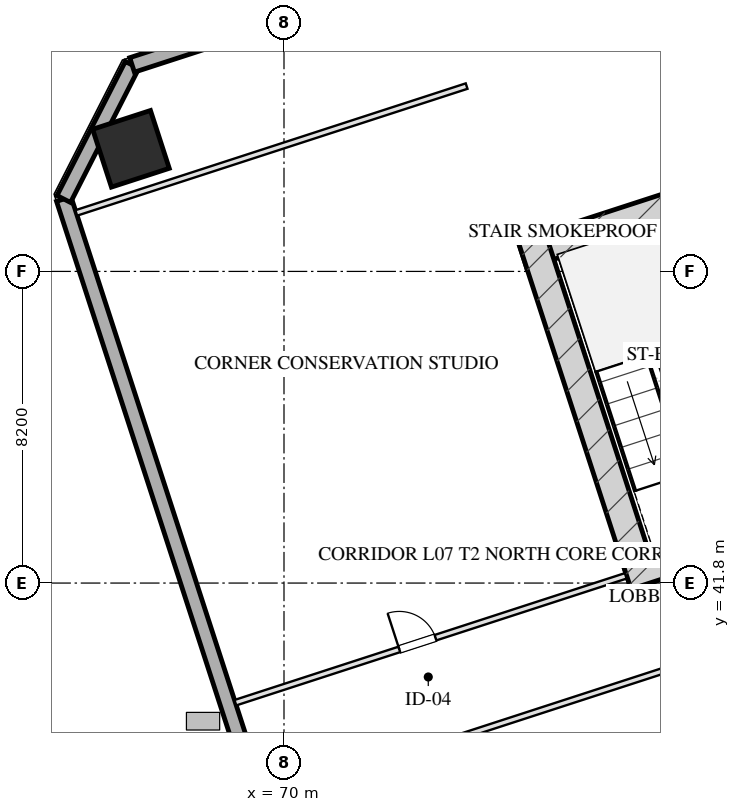
"""IFC4 building model, lengths in metres.
Left out: names, types, materials, properties, quantities, classifications, styles, units other than length and angle.
Written with IfcOpenShell. Run it as: python <this file> out.ifc"""

import sys

from ifc_helpers import new_model, si_unit, direction, frame, frame_2d, origin, origin_2d, place, context, subcontext, project, spatial, rectangle, hollow_rectangle, extrude, element, fill, save


model = new_model("IFC4")
c1 = context("Model", 3, precision=1e-05, world=origin(), true_north=direction((0.0, 1.0)))
c2 = subcontext(c1, "Body", "Model", "MODEL_VIEW")
j1 = project(units=[si_unit("LENGTHUNIT", "METRE"), si_unit("PLANEANGLEUNIT", "RADIAN")], contexts=[c1])
p1 = place(None, origin())
s1 = spatial("IfcSite", under=j1, at=p1, CompositionType="ELEMENT")
p2 = place(p1, origin())
s2 = spatial("IfcBuilding", under=s1, at=p2, CompositionType="ELEMENT")
p3 = place(p2, frame((0.0, 0.0, 34.0)))
s3 = spatial("IfcBuildingStorey", under=s2, at=p3, CompositionType="ELEMENT", Elevation=34.0)
p4 = place(p3, frame((76.272, 50.443, 0.0), z_axis=(0.0, 0.0, 1.0), x_axis=(0.951056072937, 0.309018358888, 0.0)))
e1 = element("IfcWall", 1, at=p4, inside=s3, PredefinedType="SHEAR", context=c2, shape_type="SweptSolid", body=[
    extrude(rectangle(XDim=16.55, YDim=0.75, at=frame_2d((8.275, 0.0))), origin(), (0.0, 0.0, 1.0), 4.0),
])
p5 = place(p3, frame((79.489, 41.756, 0.0), z_axis=(0.0, 0.0, 1.0), x_axis=(-0.309016134813, 0.951056795583, 0.0)))
e2 = element("IfcWall", 2, at=p5, inside=s3, PredefinedType="SHEAR", context=c2, shape_type="SweptSolid", body=[
    extrude(rectangle(XDim=9.63, YDim=0.75, at=frame_2d((4.815, 0.0))), origin(), (0.0, 0.0, 1.0), 4.0),
])
p6 = place(p3, frame((79.016, 41.997, 0.0), z_axis=(0.0, 0.0, 1.0), x_axis=(0.95106038264, 0.309005094736, 0.0)))
e3 = element("IfcWall", 3, at=p6, inside=s3, PredefinedType="SHEAR", context=c2, shape_type="SweptSolid", body=[
    extrude(rectangle(XDim=4.295, YDim=0.75, at=frame_2d((2.147, 0.0))), origin(), (0.0, 0.0, 1.0), 4.0),
])
p7 = place(p3, frame((65.973, 53.226, 0.0), z_axis=(0.0, 0.0, 1.0), x_axis=(0.951056516295, 0.309016994375, 0.0)))
e4 = element("IfcColumn", 4, at=p7, inside=s3, PredefinedType="COLUMN", context=c2, shape_type="SweptSolid", body=[
    extrude(hollow_rectangle(XDim=1.6, YDim=1.6, WallThickness=0.055, at=origin_2d()), origin(), (0.0, 0.0, 1.0), 4.001),
])
p8 = place(p3, frame((79.655, 4.352, 0.0), z_axis=(0.0, 0.0, 1.0), x_axis=(-0.309014526607, 0.951057318118, 0.0)))
e5 = element("IfcWall", 5, at=p8, inside=s3, PredefinedType="SOLIDWALL", context=c2, shape_type="SweptSolid", body=[
    extrude(rectangle(XDim=50.0, YDim=0.4, at=frame_2d((25.0, 0.0))), origin(), (0.0, 0.0, 1.0), 3.16),
])
p9 = place(p8, frame((17.35, 0.0, 0.75)))
e6 = element("IfcOpeningElement", 6, at=p9, cuts=e5, PredefinedType="OPENING", context=c2, shape_type="SweptSolid", body=[
    extrude(rectangle(XDim=2.5, YDim=1.75, at=frame_2d((1.25, 0.875))), frame((0.0, 0.21, 0.0), z_axis=(0.0, -1.0, 0.0), x_axis=(1.0, 0.0, 0.0)), (0.0, 0.0, 1.0), 0.42),
])
p10 = place(p8, frame((21.15, 0.0, 0.75)))
e7 = element("IfcOpeningElement", 7, at=p10, cuts=e5, PredefinedType="OPENING", context=c2, shape_type="SweptSolid", body=[
    extrude(rectangle(XDim=2.5, YDim=1.75, at=frame_2d((1.25, 0.875))), frame((0.0, 0.21, 0.0), z_axis=(0.0, -1.0, 0.0), x_axis=(1.0, 0.0, 0.0)), (0.0, 0.0, 1.0), 0.42),
])
p11 = place(p8, frame((27.38, 0.0, 0.0)))
e8 = element("IfcOpeningElement", 8, at=p11, cuts=e5, PredefinedType="OPENING", context=c2, shape_type="SweptSolid", body=[
    extrude(rectangle(XDim=1.1, YDim=2.15, at=frame_2d((0.55, 1.075))), frame((0.0, 0.21, 0.0), z_axis=(0.0, -1.0, 0.0), x_axis=(1.0, 0.0, 0.0)), (0.0, 0.0, 1.0), 0.42),
])
p12 = place(p3, frame((64.205, 51.905, 0.0), z_axis=(0.0, 0.0, 1.0), x_axis=(0.453958106755, 0.891023028497, 0.0)))
e9 = element("IfcWall", 9, at=p12, inside=s3, PredefinedType="SOLIDWALL", context=c2, shape_type="SweptSolid", body=[
    extrude(rectangle(XDim=3.96, YDim=0.4, at=frame_2d((1.98, 0.0))), origin(), (0.0, 0.0, 1.0), 3.16),
])
p13 = place(p3, frame((66.002, 55.433, 0.0), z_axis=(0.0, 0.0, 1.0), x_axis=(0.951055939317, 0.309018770125, 0.0)))
e10 = element("IfcWall", 10, at=p13, inside=s3, PredefinedType="SOLIDWALL", context=c2, shape_type="SweptSolid", body=[
    extrude(rectangle(XDim=32.4, YDim=0.4, at=frame_2d((16.2, 0.0))), origin(), (0.0, 0.0, 1.0), 3.16),
])
p14 = place(p3, frame((64.534, 51.539, 0.0), z_axis=(0.0, 0.0, 1.0), x_axis=(0.951056658866, 0.309016555588, 0.0)))
e11 = element("IfcWall", 11, at=p14, inside=s3, PredefinedType="PARTITIONING", context=c2, shape_type="SweptSolid", body=[
    extrude(rectangle(XDim=10.8, YDim=0.15, at=frame_2d((5.4, 0.0))), origin(), (0.0, 0.0, 1.0), 3.725),
])
p15 = place(p3, frame((68.721, 38.652, 0.0), z_axis=(0.0, 0.0, 1.0), x_axis=(0.951056658866, 0.309016555588, 0.0)))
e12 = element("IfcWall", 12, at=p15, inside=s3, PredefinedType="PARTITIONING", context=c2, shape_type="SweptSolid", body=[
    extrude(rectangle(XDim=10.8, YDim=0.15, at=frame_2d((5.4, 0.0))), origin(), (0.0, 0.0, 1.0), 3.725),
])
p16 = place(p15, frame((4.536, 0.0, 0.0)))
e13 = element("IfcOpeningElement", 13, at=p16, cuts=e12, PredefinedType="OPENING", context=c2, shape_type="SweptSolid", body=[
    extrude(rectangle(XDim=1.0, YDim=2.05, at=frame_2d((0.5, 1.025))), frame((0.0, 0.085, 0.0), z_axis=(0.0, -1.0, 0.0), x_axis=(1.0, 0.0, 0.0)), (0.0, 0.0, 1.0), 0.17),
])
p17 = place(p3, frame((69.549, 36.103, 0.0), z_axis=(0.0, 0.0, 1.0), x_axis=(0.951058077006, 0.309012190961, 0.0)))
e14 = element("IfcWall", 14, at=p17, inside=s3, PredefinedType="PARTITIONING", context=c2, shape_type="SweptSolid", body=[
    extrude(rectangle(XDim=13.375, YDim=0.15, at=frame_2d((6.688, 0.0))), origin(), (0.0, 0.0, 1.0), 3.725),
])
p18 = place(p16, origin())
e15 = element("IfcDoor", 15, at=p18, inside=s3, OperationType="SINGLE_SWING_LEFT", PredefinedType="DOOR", context=c2, shape_type="SweptSolid", body=[
    extrude(rectangle(XDim=1.0, YDim=2.05, at=frame_2d((0.5, 1.025))), frame((0.0, 0.025, 0.0), z_axis=(0.0, -1.0, 0.0), x_axis=(1.0, 0.0, 0.0)), (0.0, 0.0, 1.0), 0.05),
])
fill(e13, e15)
save(model, sys.argv[1])
